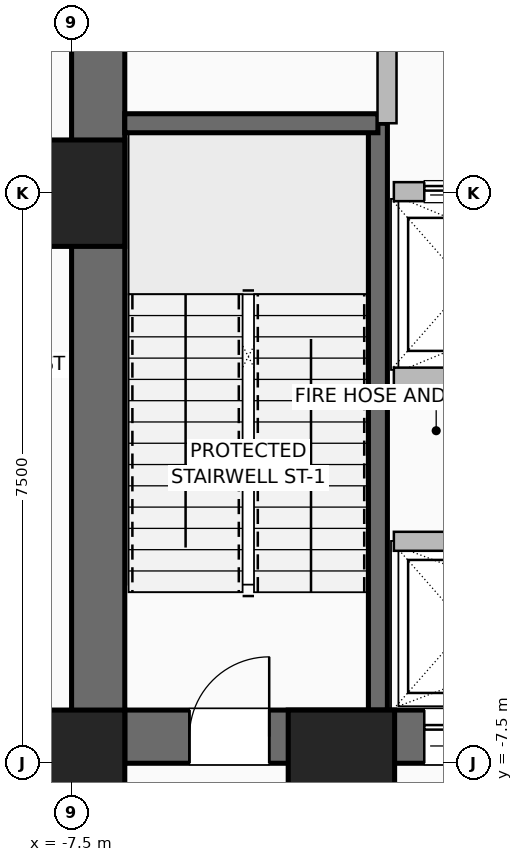
"""IFC4 building model, lengths in metres.
Left out: names, types, materials, properties, quantities, classifications, styles, units other than length and angle.
Written with IfcOpenShell. Run it as: python <this file> out.ifc"""

import sys

from ifc_helpers import new_model, si_unit, direction, frame, frame_2d, origin, origin_2d, place, context, subcontext, project, spatial, rectangle, hollow_rectangle, extrude, element, fill, save


model = new_model("IFC4")
c1 = context("Model", 3, precision=1e-05, world=origin(), true_north=direction((0.0, 1.0)))
c2 = subcontext(c1, "Body", "Model", "MODEL_VIEW")
j1 = project(units=[si_unit("LENGTHUNIT", "METRE"), si_unit("PLANEANGLEUNIT", "RADIAN")], contexts=[c1])
p1 = place(None, origin())
s1 = spatial("IfcSite", under=j1, at=p1, CompositionType="ELEMENT")
p2 = place(p1, origin())
s2 = spatial("IfcBuilding", under=s1, at=p2, CompositionType="ELEMENT")
p3 = place(p2, frame((0.0, 0.0, 5.4)))
s3 = spatial("IfcBuildingStorey", under=s2, at=p3, CompositionType="ELEMENT", Elevation=5.4)
for number, where, z_axis, x_axis in (
    (1, (-7.5, -7.5, 0.0), (0.0, 0.0, 1.0), (1.0, 0.0, 0.0)),
    (2, (-3.95, -7.5, 0.0), (0.0, 0.0, 1.0), (1.0, 0.0, 0.0)),
    (3, (-7.5, 0.0, 0.0), (0.0, 0.0, 1.0), (1.0, 0.0, 0.0)),
):
    element("IfcColumn", number, at=place(p3, frame(where, z_axis=z_axis, x_axis=x_axis)), inside=s3, PredefinedType="COLUMN", context=c2, shape_type="SweptSolid", body=[
        extrude(hollow_rectangle(XDim=1.4, YDim=1.4, WallThickness=0.06, at=origin_2d()), origin(), (0.0, 0.0, 1.0), 5.4),
    ])
p4 = place(p3, frame((-7.5, -7.15, 0.0), z_axis=(0.0, 0.0, 1.0), x_axis=(1.0, 0.0, 0.0)))
e4 = element("IfcWall", 4, at=p4, inside=s3, PredefinedType="SHEAR", context=c2, shape_type="SweptSolid", body=[
    extrude(rectangle(XDim=15.0, YDim=0.7, at=frame_2d((7.5, 0.0))), origin(), (0.0, 0.0, 1.0), 5.0),
])
p5 = place(p4, frame((1.55, 0.0, 0.0)))
e5 = element("IfcOpeningElement", 5, at=p5, cuts=e4, PredefinedType="OPENING", context=c2, shape_type="SweptSolid", body=[
    extrude(rectangle(XDim=1.05, YDim=2.08, at=frame_2d((0.525, 1.04))), frame((0.0, 0.36, 0.0), z_axis=(0.0, -1.0, 0.0), x_axis=(1.0, 0.0, 0.0)), (0.0, 0.0, 1.0), 0.72),
])
p6 = place(p4, frame((12.4, 0.0, 0.0)))
e6 = element("IfcOpeningElement", 6, at=p6, cuts=e4, PredefinedType="OPENING", context=c2, shape_type="SweptSolid", body=[
    extrude(rectangle(XDim=1.05, YDim=2.08, at=frame_2d((0.525, 1.04))), frame((0.0, 0.36, 0.0), z_axis=(0.0, -1.0, 0.0), x_axis=(1.0, 0.0, 0.0)), (0.0, 0.0, 1.0), 0.72),
])
p7 = place(p4, frame((4.64, 0.0, 0.0)))
e7 = element("IfcOpeningElement", 7, at=p7, cuts=e4, PredefinedType="OPENING", context=c2, shape_type="SweptSolid", body=[
    extrude(rectangle(XDim=1.1, YDim=2.2, at=frame_2d((0.55, 1.1))), frame((0.0, 0.36, 0.0), z_axis=(0.0, -1.0, 0.0), x_axis=(1.0, 0.0, 0.0)), (0.0, 0.0, 1.0), 0.72),
])
p8 = place(p4, frame((6.52, 0.0, 0.0)))
e8 = element("IfcOpeningElement", 8, at=p8, cuts=e4, PredefinedType="OPENING", context=c2, shape_type="SweptSolid", body=[
    extrude(rectangle(XDim=1.1, YDim=2.2, at=frame_2d((0.55, 1.1))), frame((0.0, 0.36, 0.0), z_axis=(0.0, -1.0, 0.0), x_axis=(1.0, 0.0, 0.0)), (0.0, 0.0, 1.0), 0.72),
])
p9 = place(p4, frame((8.4, 0.0, 0.0)))
e9 = element("IfcOpeningElement", 9, at=p9, cuts=e4, PredefinedType="OPENING", context=c2, shape_type="SweptSolid", body=[
    extrude(rectangle(XDim=1.1, YDim=2.2, at=frame_2d((0.55, 1.1))), frame((0.0, 0.36, 0.0), z_axis=(0.0, -1.0, 0.0), x_axis=(1.0, 0.0, 0.0)), (0.0, 0.0, 1.0), 0.72),
])
p10 = place(p3, frame((-7.15, -7.5, 0.0), z_axis=(0.0, 0.0, 1.0), x_axis=(0.0, 1.0, 0.0)))
e10 = element("IfcWall", 10, at=p10, inside=s3, PredefinedType="SHEAR", context=c2, shape_type="SweptSolid", body=[
    extrude(rectangle(XDim=15.0, YDim=0.7, at=frame_2d((7.5, 0.0))), origin(), (0.0, 0.0, 1.0), 5.0),
])
p11 = place(p10, frame((9.5, 0.0, 0.0)))
e11 = element("IfcOpeningElement", 11, at=p11, cuts=e10, PredefinedType="OPENING", context=c2, shape_type="SweptSolid", body=[
    extrude(rectangle(XDim=1.0, YDim=2.08, at=frame_2d((0.5, 1.04))), frame((0.0, 0.36, 0.0), z_axis=(0.0, -1.0, 0.0), x_axis=(1.0, 0.0, 0.0)), (0.0, 0.0, 1.0), 0.72),
])
p12 = place(p3, frame((-3.47, -6.8, 0.0), z_axis=(0.0, 0.0, 1.0), x_axis=(0.0, 1.0, 0.0)))
e12 = element("IfcWall", 12, at=p12, inside=s3, PredefinedType="SHEAR", context=c2, shape_type="SweptSolid", body=[
    extrude(rectangle(XDim=7.72, YDim=0.25, at=frame_2d((3.86, 0.0))), origin(), (0.0, 0.0, 1.0), 5.0),
])
p13 = place(p3, frame((-6.8, 0.92, 0.0), z_axis=(0.0, 0.0, 1.0), x_axis=(1.0, 0.0, 0.0)))
e13 = element("IfcWall", 13, at=p13, inside=s3, PredefinedType="SHEAR", context=c2, shape_type="SweptSolid", body=[
    extrude(rectangle(XDim=3.33, YDim=0.25, at=frame_2d((1.665, 0.0))), origin(), (0.0, 0.0, 1.0), 5.0),
])
p14 = place(p3, frame((-3.26, -4.58, 0.0), z_axis=(0.0, 0.0, 1.0), x_axis=(1.0, 0.0, 0.0)))
e14 = element("IfcWall", 14, at=p14, inside=s3, PredefinedType="SHEAR", context=c2, shape_type="SweptSolid", body=[
    extrude(rectangle(XDim=5.64, YDim=0.25, at=frame_2d((2.82, 0.0))), origin(), (0.0, 0.0, 1.0), 5.0),
])
p15 = place(p3, frame((-3.26, 0.02, 0.0), z_axis=(0.0, 0.0, 1.0), x_axis=(1.0, 0.0, 0.0)))
e15 = element("IfcWall", 15, at=p15, inside=s3, PredefinedType="SHEAR", context=c2, shape_type="SweptSolid", body=[
    extrude(rectangle(XDim=5.64, YDim=0.25, at=frame_2d((2.82, 0.0))), origin(), (0.0, 0.0, 1.0), 5.0),
])
p16 = place(p15, frame((0.4, 0.0, 0.0)))
e16 = element("IfcOpeningElement", 16, at=p16, cuts=e15, PredefinedType="OPENING", context=c2, shape_type="SweptSolid", body=[
    extrude(rectangle(XDim=1.1, YDim=2.2, at=frame_2d((0.55, 1.1))), frame((0.0, 0.135, 0.0), z_axis=(0.0, -1.0, 0.0), x_axis=(1.0, 0.0, 0.0)), (0.0, 0.0, 1.0), 0.27),
])
p17 = place(p15, frame((2.28, 0.0, 0.0)))
e17 = element("IfcOpeningElement", 17, at=p17, cuts=e15, PredefinedType="OPENING", context=c2, shape_type="SweptSolid", body=[
    extrude(rectangle(XDim=1.1, YDim=2.2, at=frame_2d((0.55, 1.1))), frame((0.0, 0.135, 0.0), z_axis=(0.0, -1.0, 0.0), x_axis=(1.0, 0.0, 0.0)), (0.0, 0.0, 1.0), 0.27),
])
p18 = place(p15, frame((4.16, 0.0, 0.0)))
e18 = element("IfcOpeningElement", 18, at=p18, cuts=e15, PredefinedType="OPENING", context=c2, shape_type="SweptSolid", body=[
    extrude(rectangle(XDim=1.1, YDim=2.2, at=frame_2d((0.55, 1.1))), frame((0.0, 0.135, 0.0), z_axis=(0.0, -1.0, 0.0), x_axis=(1.0, 0.0, 0.0)), (0.0, 0.0, 1.0), 0.27),
])
p19 = place(p3, frame((-3.26, -2.42, 0.0), z_axis=(0.0, 0.0, 1.0), x_axis=(1.0, 0.0, 0.0)))
e19 = element("IfcWall", 19, at=p19, inside=s3, PredefinedType="SHEAR", context=c2, shape_type="SweptSolid", body=[
    extrude(rectangle(XDim=5.64, YDim=0.25, at=frame_2d((2.82, 0.0))), origin(), (0.0, 0.0, 1.0), 5.0),
])
p20 = place(p3, frame((-3.35, 0.92, 0.0), z_axis=(0.0, 0.0, 1.0), x_axis=(0.0, 1.0, 0.0)))
e20 = element("IfcWall", 20, at=p20, inside=s3, PredefinedType="SHEAR", context=c2, shape_type="SweptSolid", body=[
    extrude(rectangle(XDim=3.62, YDim=0.25, at=frame_2d((1.81, 0.0))), origin(), (0.0, 0.0, 1.0), 5.0),
])
p21 = place(p20, frame((1.85, 0.0, 0.0)))
e21 = element("IfcOpeningElement", 21, at=p21, cuts=e20, PredefinedType="OPENING", context=c2, shape_type="SweptSolid", body=[
    extrude(rectangle(XDim=1.0, YDim=2.08, at=frame_2d((0.5, 1.04))), frame((0.0, 0.135, 0.0), z_axis=(0.0, -1.0, 0.0), x_axis=(1.0, 0.0, 0.0)), (0.0, 0.0, 1.0), 0.27),
])
p22 = place(p5, origin())
e22 = element("IfcDoor", 22, at=p22, inside=s3, OperationType="SINGLE_SWING_RIGHT", PredefinedType="DOOR", context=c2, shape_type="SweptSolid", body=[
    extrude(rectangle(XDim=1.05, YDim=2.08, at=frame_2d((0.525, 1.04))), frame((0.0, 0.025, 0.0), z_axis=(0.0, -1.0, 0.0), x_axis=(1.0, 0.0, 0.0)), (0.0, 0.0, 1.0), 0.05),
])
fill(e5, e22)
p23 = place(p7, origin())
e23 = element("IfcDoor", 23, at=p23, inside=s3, OperationType="DOUBLE_DOOR_SLIDING", PredefinedType="DOOR", context=c2, shape_type="SweptSolid", body=[
    extrude(rectangle(XDim=1.1, YDim=2.2, at=frame_2d((0.55, 1.1))), frame((0.0, 0.025, 0.0), z_axis=(0.0, -1.0, 0.0), x_axis=(1.0, 0.0, 0.0)), (0.0, 0.0, 1.0), 0.05),
])
fill(e7, e23)
p24 = place(p16, origin())
e24 = element("IfcDoor", 24, at=p24, inside=s3, OperationType="DOUBLE_DOOR_SLIDING", PredefinedType="DOOR", context=c2, shape_type="SweptSolid", body=[
    extrude(rectangle(XDim=1.1, YDim=2.2, at=frame_2d((0.55, 1.1))), frame((0.0, 0.025, 0.0), z_axis=(0.0, -1.0, 0.0), x_axis=(1.0, 0.0, 0.0)), (0.0, 0.0, 1.0), 0.05),
])
fill(e16, e24)
save(model, sys.argv[1])
